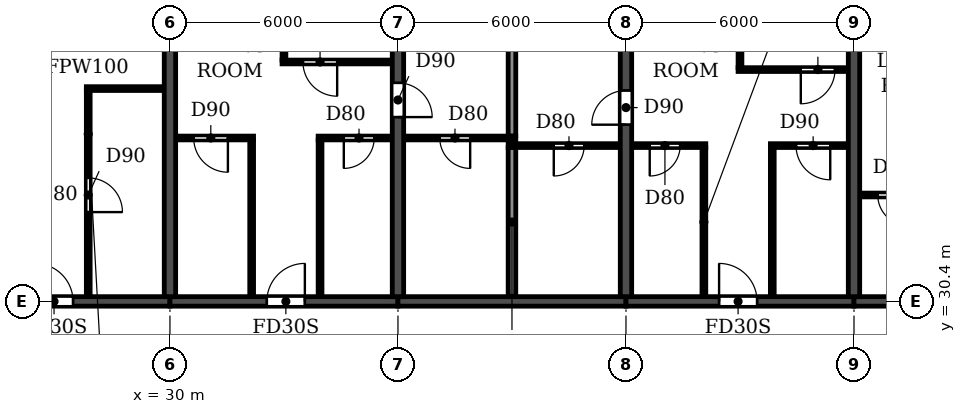
"""IFC4 building model, lengths in metres.
Left out: names, types, materials, properties, quantities, classifications, styles, units other than length and angle.
Written with IfcOpenShell. Run it as: python <this file> out.ifc"""

import sys

from ifc_helpers import new_model, si_unit, direction, frame, frame_2d, origin, place, context, subcontext, project, spatial, rectangle, extrude, element, fill, save


model = new_model("IFC4")
c1 = context("Model", 3, precision=1e-05, world=origin(), true_north=direction((0.0, 1.0)))
c2 = subcontext(c1, "Body", "Model", "MODEL_VIEW")
j1 = project(units=[si_unit("LENGTHUNIT", "METRE"), si_unit("PLANEANGLEUNIT", "RADIAN")], contexts=[c1])
p1 = place(None, origin())
s1 = spatial("IfcSite", under=j1, at=p1, CompositionType="ELEMENT")
p2 = place(p1, origin())
s2 = spatial("IfcBuilding", under=s1, at=p2, CompositionType="ELEMENT")
p3 = place(p2, frame((0.0, 0.0, 152.1)))
s3 = spatial("IfcBuildingStorey", under=s2, at=p3, CompositionType="ELEMENT", Elevation=152.1)
p4 = place(p3, frame((30.0, 30.525, 0.0), z_axis=(0.0, 0.0, 1.0), x_axis=(0.0, 1.0, 0.0)))
e1 = element("IfcWall", 1, at=p4, inside=s3, PredefinedType="SHEAR", context=c2, shape_type="SweptSolid", body=[
    extrude(rectangle(XDim=11.675, YDim=0.3, at=frame_2d((5.837, 0.0))), origin(), (0.0, 0.0, 1.0), 3.07),
])
p5 = place(p3, frame((36.0, 30.525, 0.0), z_axis=(0.0, 0.0, 1.0), x_axis=(0.0, 1.0, 0.0)))
e2 = element("IfcWall", 2, at=p5, inside=s3, PredefinedType="SHEAR", context=c2, shape_type="SweptSolid", body=[
    extrude(rectangle(XDim=11.675, YDim=0.3, at=frame_2d((5.837, 0.0))), origin(), (0.0, 0.0, 1.0), 3.07),
])
p6 = place(p5, frame((4.725, 0.0, 0.0)))
e3 = element("IfcOpeningElement", 3, at=p6, cuts=e2, PredefinedType="OPENING", context=c2, shape_type="SweptSolid", body=[
    extrude(rectangle(XDim=0.9, YDim=2.1, at=frame_2d((0.45, 1.05))), frame((0.0, 0.16, 0.0), z_axis=(0.0, -1.0, 0.0), x_axis=(1.0, 0.0, 0.0)), (0.0, 0.0, 1.0), 0.32),
])
p7 = place(p3, frame((42.0, 30.525, 0.0), z_axis=(0.0, 0.0, 1.0), x_axis=(0.0, 1.0, 0.0)))
e4 = element("IfcWall", 4, at=p7, inside=s3, PredefinedType="SHEAR", context=c2, shape_type="SweptSolid", body=[
    extrude(rectangle(XDim=11.675, YDim=0.3, at=frame_2d((5.837, 0.0))), origin(), (0.0, 0.0, 1.0), 3.07),
])
p8 = place(p7, frame((4.525, 0.0, 0.0)))
e5 = element("IfcOpeningElement", 5, at=p8, cuts=e4, PredefinedType="OPENING", context=c2, shape_type="SweptSolid", body=[
    extrude(rectangle(XDim=0.9, YDim=2.1, at=frame_2d((0.45, 1.05))), frame((0.0, 0.16, 0.0), z_axis=(0.0, -1.0, 0.0), x_axis=(1.0, 0.0, 0.0)), (0.0, 0.0, 1.0), 0.32),
])
p9 = place(p3, frame((48.0, 30.525, 0.0), z_axis=(0.0, 0.0, 1.0), x_axis=(0.0, 1.0, 0.0)))
e6 = element("IfcWall", 6, at=p9, inside=s3, PredefinedType="SHEAR", context=c2, shape_type="SweptSolid", body=[
    extrude(rectangle(XDim=11.675, YDim=0.3, at=frame_2d((5.837, 0.0))), origin(), (0.0, 0.0, 1.0), 3.07),
])
p10 = place(p3, frame((24.0, 30.4, 0.0), z_axis=(0.0, 0.0, 1.0), x_axis=(1.0, 0.0, 0.0)))
e7 = element("IfcWall", 7, at=p10, inside=s3, PredefinedType="SHEAR", context=c2, shape_type="SweptSolid", body=[
    extrude(rectangle(XDim=6.0, YDim=0.25, at=frame_2d((3.0, 0.0))), origin(), (0.0, 0.0, 1.0), 2.47),
])
p11 = place(p10, frame((2.45, 0.0, 0.0)))
e8 = element("IfcOpeningElement", 8, at=p11, cuts=e7, PredefinedType="OPENING", context=c2, shape_type="SweptSolid", body=[
    extrude(rectangle(XDim=1.0, YDim=2.1, at=frame_2d((0.5, 1.05))), frame((0.0, 0.135, 0.0), z_axis=(0.0, -1.0, 0.0), x_axis=(1.0, 0.0, 0.0)), (0.0, 0.0, 1.0), 0.27),
])
p12 = place(p3, frame((30.0, 30.4, 0.0), z_axis=(0.0, 0.0, 1.0), x_axis=(1.0, 0.0, 0.0)))
e9 = element("IfcWall", 9, at=p12, inside=s3, PredefinedType="SHEAR", context=c2, shape_type="SweptSolid", body=[
    extrude(rectangle(XDim=6.0, YDim=0.25, at=frame_2d((3.0, 0.0))), origin(), (0.0, 0.0, 1.0), 2.47),
])
p13 = place(p12, frame((2.55, 0.0, 0.0)))
e10 = element("IfcOpeningElement", 10, at=p13, cuts=e9, PredefinedType="OPENING", context=c2, shape_type="SweptSolid", body=[
    extrude(rectangle(XDim=1.0, YDim=2.1, at=frame_2d((0.5, 1.05))), frame((0.0, 0.135, 0.0), z_axis=(0.0, -1.0, 0.0), x_axis=(1.0, 0.0, 0.0)), (0.0, 0.0, 1.0), 0.27),
])
p14 = place(p3, frame((36.0, 30.4, 0.0), z_axis=(0.0, 0.0, 1.0), x_axis=(1.0, 0.0, 0.0)))
e11 = element("IfcWall", 11, at=p14, inside=s3, PredefinedType="SHEAR", context=c2, shape_type="SweptSolid", body=[
    extrude(rectangle(XDim=6.0, YDim=0.25, at=frame_2d((3.0, 0.0))), origin(), (0.0, 0.0, 1.0), 2.47),
])
p15 = place(p3, frame((42.0, 30.4, 0.0), z_axis=(0.0, 0.0, 1.0), x_axis=(1.0, 0.0, 0.0)))
e12 = element("IfcWall", 12, at=p15, inside=s3, PredefinedType="SHEAR", context=c2, shape_type="SweptSolid", body=[
    extrude(rectangle(XDim=6.0, YDim=0.25, at=frame_2d((3.0, 0.0))), origin(), (0.0, 0.0, 1.0), 2.47),
])
p16 = place(p15, frame((2.45, 0.0, 0.0)))
e13 = element("IfcOpeningElement", 13, at=p16, cuts=e12, PredefinedType="OPENING", context=c2, shape_type="SweptSolid", body=[
    extrude(rectangle(XDim=1.0, YDim=2.1, at=frame_2d((0.5, 1.05))), frame((0.0, 0.135, 0.0), z_axis=(0.0, -1.0, 0.0), x_axis=(1.0, 0.0, 0.0)), (0.0, 0.0, 1.0), 0.27),
])
p17 = place(p3, frame((48.0, 30.4, 0.0), z_axis=(0.0, 0.0, 1.0), x_axis=(1.0, 0.0, 0.0)))
e14 = element("IfcWall", 14, at=p17, inside=s3, PredefinedType="SHEAR", context=c2, shape_type="SweptSolid", body=[
    extrude(rectangle(XDim=6.0, YDim=0.25, at=frame_2d((3.0, 0.0))), origin(), (0.0, 0.0, 1.0), 2.47),
])
p18 = place(p17, frame((2.45, 0.0, 0.0)))
e15 = element("IfcOpeningElement", 15, at=p18, cuts=e14, PredefinedType="OPENING", context=c2, shape_type="SweptSolid", body=[
    extrude(rectangle(XDim=1.0, YDim=2.1, at=frame_2d((0.5, 1.05))), frame((0.0, 0.135, 0.0), z_axis=(0.0, -1.0, 0.0), x_axis=(1.0, 0.0, 0.0)), (0.0, 0.0, 1.0), 0.27),
])
p19 = place(p3, frame((39.0, 30.535, 0.0), z_axis=(0.0, 0.0, 1.0), x_axis=(0.0, 1.0, 0.0)))
e16 = element("IfcWall", 16, at=p19, inside=s3, PredefinedType="PARTITIONING", context=c2, shape_type="SweptSolid", body=[
    extrude(rectangle(XDim=3.915, YDim=0.2, at=frame_2d((1.958, 0.0))), origin(), (0.0, 0.0, 1.0), 3.07),
])
p20 = place(p3, frame((39.0, 34.75, 0.0), z_axis=(0.0, 0.0, 1.0), x_axis=(0.0, 1.0, 0.0)))
e17 = element("IfcWall", 17, at=p20, inside=s3, PredefinedType="PARTITIONING", context=c2, shape_type="SweptSolid", body=[
    extrude(rectangle(XDim=7.59, YDim=0.2, at=frame_2d((3.795, 0.0))), origin(), (0.0, 0.0, 1.0), 3.07),
])
p21 = place(p3, frame((48.16, 33.2, 0.0), z_axis=(0.0, 0.0, 1.0), x_axis=(1.0, 0.0, 0.0)))
e18 = element("IfcWall", 18, at=p21, inside=s3, PredefinedType="PARTITIONING", context=c2, shape_type="SweptSolid", body=[
    extrude(rectangle(XDim=1.94, YDim=0.1, at=frame_2d((0.97, 0.0))), origin(), (0.0, 0.0, 1.0), 3.07),
])
p22 = place(p21, frame((0.465, 0.0, 0.0)))
e19 = element("IfcOpeningElement", 19, at=p22, cuts=e18, PredefinedType="OPENING", context=c2, shape_type="SweptSolid", body=[
    extrude(rectangle(XDim=0.8, YDim=2.1, at=frame_2d((0.4, 1.05))), frame((0.0, 0.06, 0.0), z_axis=(0.0, -1.0, 0.0), x_axis=(1.0, 0.0, 0.0)), (0.0, 0.0, 1.0), 0.12),
])
p23 = place(p3, frame((38.9, 34.5, 0.0), z_axis=(0.0, 0.0, 1.0), x_axis=(1.0, 0.0, 0.0)))
e20 = element("IfcWall", 20, at=p23, inside=s3, PredefinedType="PARTITIONING", context=c2, shape_type="SweptSolid", body=[
    extrude(rectangle(XDim=2.94, YDim=0.1, at=frame_2d((1.47, 0.0))), origin(), (0.0, 0.0, 1.0), 3.07),
])
p24 = place(p23, frame((1.2, 0.0, 0.0)))
e21 = element("IfcOpeningElement", 21, at=p24, cuts=e20, PredefinedType="OPENING", context=c2, shape_type="SweptSolid", body=[
    extrude(rectangle(XDim=0.8, YDim=2.1, at=frame_2d((0.4, 1.05))), frame((0.0, 0.06, 0.0), z_axis=(0.0, -1.0, 0.0), x_axis=(1.0, 0.0, 0.0)), (0.0, 0.0, 1.0), 0.12),
])
p25 = place(p3, frame((42.16, 34.5, 0.0), z_axis=(0.0, 0.0, 1.0), x_axis=(1.0, 0.0, 0.0)))
e22 = element("IfcWall", 22, at=p25, inside=s3, PredefinedType="PARTITIONING", context=c2, shape_type="SweptSolid", body=[
    extrude(rectangle(XDim=1.94, YDim=0.1, at=frame_2d((0.97, 0.0))), origin(), (0.0, 0.0, 1.0), 3.07),
])
p26 = place(p25, frame((0.465, 0.0, 0.0)))
e23 = element("IfcOpeningElement", 23, at=p26, cuts=e22, PredefinedType="OPENING", context=c2, shape_type="SweptSolid", body=[
    extrude(rectangle(XDim=0.8, YDim=2.1, at=frame_2d((0.4, 1.05))), frame((0.0, 0.06, 0.0), z_axis=(0.0, -1.0, 0.0), x_axis=(1.0, 0.0, 0.0)), (0.0, 0.0, 1.0), 0.12),
])
p27 = place(p3, frame((45.8, 34.5, 0.0), z_axis=(0.0, 0.0, 1.0), x_axis=(1.0, 0.0, 0.0)))
e24 = element("IfcWall", 24, at=p27, inside=s3, PredefinedType="PARTITIONING", context=c2, shape_type="SweptSolid", body=[
    extrude(rectangle(XDim=2.04, YDim=0.1, at=frame_2d((1.02, 0.0))), origin(), (0.0, 0.0, 1.0), 3.07),
])
p28 = place(p27, frame((0.675, 0.0, 0.0)))
e25 = element("IfcOpeningElement", 25, at=p28, cuts=e24, PredefinedType="OPENING", context=c2, shape_type="SweptSolid", body=[
    extrude(rectangle(XDim=0.9, YDim=2.1, at=frame_2d((0.45, 1.05))), frame((0.0, 0.06, 0.0), z_axis=(0.0, -1.0, 0.0), x_axis=(1.0, 0.0, 0.0)), (0.0, 0.0, 1.0), 0.12),
])
p29 = place(p3, frame((30.16, 34.7, 0.0), z_axis=(0.0, 0.0, 1.0), x_axis=(1.0, 0.0, 0.0)))
e26 = element("IfcWall", 26, at=p29, inside=s3, PredefinedType="PARTITIONING", context=c2, shape_type="SweptSolid", body=[
    extrude(rectangle(XDim=2.04, YDim=0.1, at=frame_2d((1.02, 0.0))), origin(), (0.0, 0.0, 1.0), 3.07),
])
p30 = place(p29, frame((0.465, 0.0, 0.0)))
e27 = element("IfcOpeningElement", 27, at=p30, cuts=e26, PredefinedType="OPENING", context=c2, shape_type="SweptSolid", body=[
    extrude(rectangle(XDim=0.9, YDim=2.1, at=frame_2d((0.45, 1.05))), frame((0.0, 0.06, 0.0), z_axis=(0.0, -1.0, 0.0), x_axis=(1.0, 0.0, 0.0)), (0.0, 0.0, 1.0), 0.12),
])
p31 = place(p3, frame((33.9, 34.7, 0.0), z_axis=(0.0, 0.0, 1.0), x_axis=(1.0, 0.0, 0.0)))
e28 = element("IfcWall", 28, at=p31, inside=s3, PredefinedType="PARTITIONING", context=c2, shape_type="SweptSolid", body=[
    extrude(rectangle(XDim=1.94, YDim=0.1, at=frame_2d((0.97, 0.0))), origin(), (0.0, 0.0, 1.0), 3.07),
])
p32 = place(p31, frame((0.675, 0.0, 0.0)))
e29 = element("IfcOpeningElement", 29, at=p32, cuts=e28, PredefinedType="OPENING", context=c2, shape_type="SweptSolid", body=[
    extrude(rectangle(XDim=0.8, YDim=2.1, at=frame_2d((0.4, 1.05))), frame((0.0, 0.06, 0.0), z_axis=(0.0, -1.0, 0.0), x_axis=(1.0, 0.0, 0.0)), (0.0, 0.0, 1.0), 0.12),
])
p33 = place(p3, frame((36.16, 34.7, 0.0), z_axis=(0.0, 0.0, 1.0), x_axis=(1.0, 0.0, 0.0)))
e30 = element("IfcWall", 30, at=p33, inside=s3, PredefinedType="PARTITIONING", context=c2, shape_type="SweptSolid", body=[
    extrude(rectangle(XDim=2.94, YDim=0.1, at=frame_2d((1.47, 0.0))), origin(), (0.0, 0.0, 1.0), 3.07),
])
p34 = place(p33, frame((0.94, 0.0, 0.0)))
e31 = element("IfcOpeningElement", 31, at=p34, cuts=e30, PredefinedType="OPENING", context=c2, shape_type="SweptSolid", body=[
    extrude(rectangle(XDim=0.8, YDim=2.1, at=frame_2d((0.4, 1.05))), frame((0.0, 0.06, 0.0), z_axis=(0.0, -1.0, 0.0), x_axis=(1.0, 0.0, 0.0)), (0.0, 0.0, 1.0), 0.12),
])
p35 = place(p3, frame((27.8, 36.0, 0.0), z_axis=(0.0, 0.0, 1.0), x_axis=(1.0, 0.0, 0.0)))
e32 = element("IfcWall", 32, at=p35, inside=s3, PredefinedType="PARTITIONING", context=c2, shape_type="SweptSolid", body=[
    extrude(rectangle(XDim=2.04, YDim=0.1, at=frame_2d((1.02, 0.0))), origin(), (0.0, 0.0, 1.0), 3.07),
])
p36 = place(p3, frame((44.95, 36.5, 0.0), z_axis=(0.0, 0.0, 1.0), x_axis=(1.0, 0.0, 0.0)))
e33 = element("IfcWall", 33, at=p36, inside=s3, PredefinedType="PARTITIONING", context=c2, shape_type="SweptSolid", body=[
    extrude(rectangle(XDim=2.89, YDim=0.1, at=frame_2d((1.445, 0.0))), origin(), (0.0, 0.0, 1.0), 3.07),
])
p37 = place(p36, frame((1.65, 0.0, 0.0)))
e34 = element("IfcOpeningElement", 34, at=p37, cuts=e33, PredefinedType="OPENING", context=c2, shape_type="SweptSolid", body=[
    extrude(rectangle(XDim=0.9, YDim=2.1, at=frame_2d((0.45, 1.05))), frame((0.0, 0.06, 0.0), z_axis=(0.0, -1.0, 0.0), x_axis=(1.0, 0.0, 0.0)), (0.0, 0.0, 1.0), 0.12),
])
p38 = place(p3, frame((32.95, 36.7, 0.0), z_axis=(0.0, 0.0, 1.0), x_axis=(1.0, 0.0, 0.0)))
e35 = element("IfcWall", 35, at=p38, inside=s3, PredefinedType="PARTITIONING", context=c2, shape_type="SweptSolid", body=[
    extrude(rectangle(XDim=2.89, YDim=0.1, at=frame_2d((1.445, 0.0))), origin(), (0.0, 0.0, 1.0), 3.07),
])
p39 = place(p38, frame((0.55, 0.0, 0.0)))
e36 = element("IfcOpeningElement", 36, at=p39, cuts=e35, PredefinedType="OPENING", context=c2, shape_type="SweptSolid", body=[
    extrude(rectangle(XDim=0.9, YDim=2.1, at=frame_2d((0.45, 1.05))), frame((0.0, 0.06, 0.0), z_axis=(0.0, -1.0, 0.0), x_axis=(1.0, 0.0, 0.0)), (0.0, 0.0, 1.0), 0.12),
])
p40 = place(p3, frame((27.85, 30.535, 0.0), z_axis=(0.0, 0.0, 1.0), x_axis=(0.0, 1.0, 0.0)))
e37 = element("IfcWall", 37, at=p40, inside=s3, PredefinedType="PARTITIONING", context=c2, shape_type="SweptSolid", body=[
    extrude(rectangle(XDim=5.415, YDim=0.1, at=frame_2d((2.708, 0.0))), origin(), (0.0, 0.0, 1.0), 3.07),
])
p41 = place(p40, frame((2.215, 0.0, 0.0)))
e38 = element("IfcOpeningElement", 38, at=p41, cuts=e37, PredefinedType="OPENING", context=c2, shape_type="SweptSolid", body=[
    extrude(rectangle(XDim=0.9, YDim=2.1, at=frame_2d((0.45, 1.05))), frame((0.0, 0.06, 0.0), z_axis=(0.0, -1.0, 0.0), x_axis=(1.0, 0.0, 0.0)), (0.0, 0.0, 1.0), 0.12),
])
p42 = place(p3, frame((32.15, 30.535, 0.0), z_axis=(0.0, 0.0, 1.0), x_axis=(0.0, 1.0, 0.0)))
e39 = element("IfcWall", 39, at=p42, inside=s3, PredefinedType="PARTITIONING", context=c2, shape_type="SweptSolid", body=[
    extrude(rectangle(XDim=4.115, YDim=0.1, at=frame_2d((2.058, 0.0))), origin(), (0.0, 0.0, 1.0), 3.07),
])
p43 = place(p3, frame((33.0, 36.75, 0.0), z_axis=(0.0, 0.0, 1.0), x_axis=(0.0, 1.0, 0.0)))
e40 = element("IfcWall", 40, at=p43, inside=s3, PredefinedType="PARTITIONING", context=c2, shape_type="SweptSolid", body=[
    extrude(rectangle(XDim=5.59, YDim=0.1, at=frame_2d((2.795, 0.0))), origin(), (0.0, 0.0, 1.0), 3.07),
])
p44 = place(p3, frame((33.95, 30.535, 0.0), z_axis=(0.0, 0.0, 1.0), x_axis=(0.0, 1.0, 0.0)))
e41 = element("IfcWall", 41, at=p44, inside=s3, PredefinedType="PARTITIONING", context=c2, shape_type="SweptSolid", body=[
    extrude(rectangle(XDim=4.115, YDim=0.1, at=frame_2d((2.058, 0.0))), origin(), (0.0, 0.0, 1.0), 3.07),
])
p45 = place(p3, frame((44.05, 30.535, 0.0), z_axis=(0.0, 0.0, 1.0), x_axis=(0.0, 1.0, 0.0)))
e42 = element("IfcWall", 42, at=p45, inside=s3, PredefinedType="PARTITIONING", context=c2, shape_type="SweptSolid", body=[
    extrude(rectangle(XDim=3.915, YDim=0.1, at=frame_2d((1.958, 0.0))), origin(), (0.0, 0.0, 1.0), 3.07),
])
p46 = place(p3, frame((45.0, 36.55, 0.0), z_axis=(0.0, 0.0, 1.0), x_axis=(0.0, 1.0, 0.0)))
e43 = element("IfcWall", 43, at=p46, inside=s3, PredefinedType="PARTITIONING", context=c2, shape_type="SweptSolid", body=[
    extrude(rectangle(XDim=5.79, YDim=0.1, at=frame_2d((2.895, 0.0))), origin(), (0.0, 0.0, 1.0), 3.07),
])
p47 = place(p3, frame((45.85, 30.535, 0.0), z_axis=(0.0, 0.0, 1.0), x_axis=(0.0, 1.0, 0.0)))
e44 = element("IfcWall", 44, at=p47, inside=s3, PredefinedType="PARTITIONING", context=c2, shape_type="SweptSolid", body=[
    extrude(rectangle(XDim=3.915, YDim=0.1, at=frame_2d((1.958, 0.0))), origin(), (0.0, 0.0, 1.0), 3.07),
])
p48 = place(p11, origin())
e45 = element("IfcDoor", 45, at=p48, inside=s3, OperationType="SINGLE_SWING_LEFT", PredefinedType="DOOR", context=c2, shape_type="SweptSolid", body=[
    extrude(rectangle(XDim=1.0, YDim=2.1, at=frame_2d((0.5, 1.05))), frame((0.0, 0.025, 0.0), z_axis=(0.0, -1.0, 0.0), x_axis=(1.0, 0.0, 0.0)), (0.0, 0.0, 1.0), 0.05),
])
fill(e8, e45)
p49 = place(p41, frame((0.9, 0.0, 0.0), z_axis=(0.0, 0.0, 1.0), x_axis=(-1.0, 0.0, 0.0)))
e46 = element("IfcDoor", 46, at=p49, inside=s3, OperationType="SINGLE_SWING_RIGHT", PredefinedType="DOOR", context=c2, shape_type="SweptSolid", body=[
    extrude(rectangle(XDim=0.9, YDim=2.1, at=frame_2d((0.45, 1.05))), frame((0.0, 0.025, 0.0), z_axis=(0.0, -1.0, 0.0), x_axis=(1.0, 0.0, 0.0)), (0.0, 0.0, 1.0), 0.05),
])
fill(e38, e46)
p50 = place(p34, frame((0.8, 0.0, 0.0), z_axis=(0.0, 0.0, 1.0), x_axis=(-1.0, 0.0, 0.0)))
e47 = element("IfcDoor", 47, at=p50, inside=s3, OperationType="SINGLE_SWING_LEFT", PredefinedType="DOOR", context=c2, shape_type="SweptSolid", body=[
    extrude(rectangle(XDim=0.8, YDim=2.1, at=frame_2d((0.4, 1.05))), frame((0.0, 0.025, 0.0), z_axis=(0.0, -1.0, 0.0), x_axis=(1.0, 0.0, 0.0)), (0.0, 0.0, 1.0), 0.05),
])
fill(e31, e47)
p51 = place(p30, frame((0.9, 0.0, 0.0), z_axis=(0.0, 0.0, 1.0), x_axis=(-1.0, 0.0, 0.0)))
e48 = element("IfcDoor", 48, at=p51, inside=s3, OperationType="SINGLE_SWING_LEFT", PredefinedType="DOOR", context=c2, shape_type="SweptSolid", body=[
    extrude(rectangle(XDim=0.9, YDim=2.1, at=frame_2d((0.45, 1.05))), frame((0.0, 0.025, 0.0), z_axis=(0.0, -1.0, 0.0), x_axis=(1.0, 0.0, 0.0)), (0.0, 0.0, 1.0), 0.05),
])
fill(e27, e48)
p52 = place(p13, origin())
e49 = element("IfcDoor", 49, at=p52, inside=s3, OperationType="SINGLE_SWING_RIGHT", PredefinedType="DOOR", context=c2, shape_type="SweptSolid", body=[
    extrude(rectangle(XDim=1.0, YDim=2.1, at=frame_2d((0.5, 1.05))), frame((0.0, 0.025, 0.0), z_axis=(0.0, -1.0, 0.0), x_axis=(1.0, 0.0, 0.0)), (0.0, 0.0, 1.0), 0.05),
])
fill(e10, e49)
p53 = place(p39, frame((0.9, 0.0, 0.0), z_axis=(0.0, 0.0, 1.0), x_axis=(-1.0, 0.0, 0.0)))
e50 = element("IfcDoor", 50, at=p53, inside=s3, OperationType="SINGLE_SWING_LEFT", PredefinedType="DOOR", context=c2, shape_type="SweptSolid", body=[
    extrude(rectangle(XDim=0.9, YDim=2.1, at=frame_2d((0.45, 1.05))), frame((0.0, 0.025, 0.0), z_axis=(0.0, -1.0, 0.0), x_axis=(1.0, 0.0, 0.0)), (0.0, 0.0, 1.0), 0.05),
])
fill(e36, e50)
p54 = place(p32, frame((0.8, 0.0, 0.0), z_axis=(0.0, 0.0, 1.0), x_axis=(-1.0, 0.0, 0.0)))
e51 = element("IfcDoor", 51, at=p54, inside=s3, OperationType="SINGLE_SWING_RIGHT", PredefinedType="DOOR", context=c2, shape_type="SweptSolid", body=[
    extrude(rectangle(XDim=0.8, YDim=2.1, at=frame_2d((0.4, 1.05))), frame((0.0, 0.025, 0.0), z_axis=(0.0, -1.0, 0.0), x_axis=(1.0, 0.0, 0.0)), (0.0, 0.0, 1.0), 0.05),
])
fill(e29, e51)
p55 = place(p6, frame((0.9, 0.0, 0.0), z_axis=(0.0, 0.0, 1.0), x_axis=(-1.0, 0.0, 0.0)))
e52 = element("IfcDoor", 52, at=p55, inside=s3, OperationType="SINGLE_SWING_RIGHT", PredefinedType="DOOR", context=c2, shape_type="SweptSolid", body=[
    extrude(rectangle(XDim=0.9, YDim=2.1, at=frame_2d((0.45, 1.05))), frame((0.0, 0.025, 0.0), z_axis=(0.0, -1.0, 0.0), x_axis=(1.0, 0.0, 0.0)), (0.0, 0.0, 1.0), 0.05),
])
fill(e3, e52)
p56 = place(p24, frame((0.8, 0.0, 0.0), z_axis=(0.0, 0.0, 1.0), x_axis=(-1.0, 0.0, 0.0)))
e53 = element("IfcDoor", 53, at=p56, inside=s3, OperationType="SINGLE_SWING_RIGHT", PredefinedType="DOOR", context=c2, shape_type="SweptSolid", body=[
    extrude(rectangle(XDim=0.8, YDim=2.1, at=frame_2d((0.4, 1.05))), frame((0.0, 0.025, 0.0), z_axis=(0.0, -1.0, 0.0), x_axis=(1.0, 0.0, 0.0)), (0.0, 0.0, 1.0), 0.05),
])
fill(e21, e53)
p57 = place(p8, origin())
e54 = element("IfcDoor", 54, at=p57, inside=s3, OperationType="SINGLE_SWING_LEFT", PredefinedType="DOOR", context=c2, shape_type="SweptSolid", body=[
    extrude(rectangle(XDim=0.9, YDim=2.1, at=frame_2d((0.45, 1.05))), frame((0.0, 0.025, 0.0), z_axis=(0.0, -1.0, 0.0), x_axis=(1.0, 0.0, 0.0)), (0.0, 0.0, 1.0), 0.05),
])
fill(e5, e54)
p58 = place(p26, frame((0.8, 0.0, 0.0), z_axis=(0.0, 0.0, 1.0), x_axis=(-1.0, 0.0, 0.0)))
e55 = element("IfcDoor", 55, at=p58, inside=s3, OperationType="SINGLE_SWING_RIGHT", PredefinedType="DOOR", context=c2, shape_type="SweptSolid", body=[
    extrude(rectangle(XDim=0.8, YDim=2.1, at=frame_2d((0.4, 1.05))), frame((0.0, 0.025, 0.0), z_axis=(0.0, -1.0, 0.0), x_axis=(1.0, 0.0, 0.0)), (0.0, 0.0, 1.0), 0.05),
])
fill(e23, e55)
p59 = place(p16, origin())
e56 = element("IfcDoor", 56, at=p59, inside=s3, OperationType="SINGLE_SWING_LEFT", PredefinedType="DOOR", context=c2, shape_type="SweptSolid", body=[
    extrude(rectangle(XDim=1.0, YDim=2.1, at=frame_2d((0.5, 1.05))), frame((0.0, 0.025, 0.0), z_axis=(0.0, -1.0, 0.0), x_axis=(1.0, 0.0, 0.0)), (0.0, 0.0, 1.0), 0.05),
])
fill(e13, e56)
p60 = place(p28, frame((0.9, 0.0, 0.0), z_axis=(0.0, 0.0, 1.0), x_axis=(-1.0, 0.0, 0.0)))
e57 = element("IfcDoor", 57, at=p60, inside=s3, OperationType="SINGLE_SWING_LEFT", PredefinedType="DOOR", context=c2, shape_type="SweptSolid", body=[
    extrude(rectangle(XDim=0.9, YDim=2.1, at=frame_2d((0.45, 1.05))), frame((0.0, 0.025, 0.0), z_axis=(0.0, -1.0, 0.0), x_axis=(1.0, 0.0, 0.0)), (0.0, 0.0, 1.0), 0.05),
])
fill(e25, e57)
p61 = place(p37, frame((0.9, 0.0, 0.0), z_axis=(0.0, 0.0, 1.0), x_axis=(-1.0, 0.0, 0.0)))
e58 = element("IfcDoor", 58, at=p61, inside=s3, OperationType="SINGLE_SWING_RIGHT", PredefinedType="DOOR", context=c2, shape_type="SweptSolid", body=[
    extrude(rectangle(XDim=0.9, YDim=2.1, at=frame_2d((0.45, 1.05))), frame((0.0, 0.025, 0.0), z_axis=(0.0, -1.0, 0.0), x_axis=(1.0, 0.0, 0.0)), (0.0, 0.0, 1.0), 0.05),
])
fill(e34, e58)
p62 = place(p22, frame((0.8, 0.0, 0.0), z_axis=(0.0, 0.0, 1.0), x_axis=(-1.0, 0.0, 0.0)))
e59 = element("IfcDoor", 59, at=p62, inside=s3, OperationType="SINGLE_SWING_LEFT", PredefinedType="DOOR", context=c2, shape_type="SweptSolid", body=[
    extrude(rectangle(XDim=0.8, YDim=2.1, at=frame_2d((0.4, 1.05))), frame((0.0, 0.025, 0.0), z_axis=(0.0, -1.0, 0.0), x_axis=(1.0, 0.0, 0.0)), (0.0, 0.0, 1.0), 0.05),
])
fill(e19, e59)
save(model, sys.argv[1])
